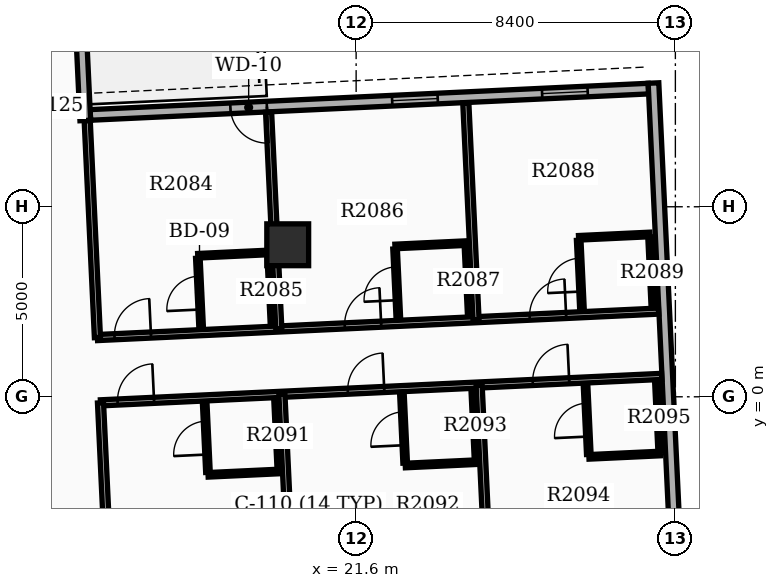
"""IFC4 building model, lengths in metres.
Left out: names, types, materials, properties, quantities, classifications, styles, units other than length and angle.
Written with IfcOpenShell. Run it as: python <this file> out.ifc"""

import sys

from ifc_helpers import new_model, si_unit, direction, frame, frame_2d, origin, origin_2d, place, context, subcontext, project, spatial, rectangle, extrude, element, fill, save


model = new_model("IFC4")
c1 = context("Model", 3, precision=1e-05, world=origin(), true_north=direction((0.0, 1.0)))
c2 = subcontext(c1, "Body", "Model", "MODEL_VIEW")
j1 = project(units=[si_unit("LENGTHUNIT", "METRE"), si_unit("PLANEANGLEUNIT", "RADIAN")], contexts=[c1])
p1 = place(None, origin())
s1 = spatial("IfcSite", under=j1, at=p1, CompositionType="ELEMENT")
p2 = place(p1, origin())
s2 = spatial("IfcBuilding", under=s1, at=p2, CompositionType="ELEMENT")
p3 = place(p2, frame((0.0, 0.0, 132.0)))
s3 = spatial("IfcBuildingStorey", under=s2, at=p3, CompositionType="ELEMENT", Elevation=132.0)
p4 = place(p3, frame((19.8, 4.0, 0.0), z_axis=(0.0, 0.0, 1.0), x_axis=(1.0, 0.0, 0.0)))
e1 = element("IfcColumn", 1, at=p4, inside=s3, PredefinedType="COLUMN", context=c2, shape_type="SweptSolid", body=[
    extrude(rectangle(XDim=1.1, YDim=1.1, at=origin_2d()), origin(), (0.0, 0.0, 1.0), 3.9),
])
p5 = place(p3, frame((29.291, 8.109, 0.0), z_axis=(0.0, 0.0, 1.0), x_axis=(-0.998889342735, -0.047117735191, 0.0)))
e2 = element("IfcWall", 2, at=p5, inside=s3, PredefinedType="STANDARD", context=c2, shape_type="SweptSolid", body=[
    extrude(rectangle(XDim=14.7, YDim=0.28, at=frame_2d((7.35, 0.0))), origin(), (0.0, 0.0, 1.0), 2.97),
])
p6 = place(p5, frame((1.6, 0.0, 0.8)))
e3 = element("IfcOpeningElement", 3, at=p6, cuts=e2, PredefinedType="OPENING", context=c2, shape_type="SweptSolid", body=[
    extrude(rectangle(XDim=1.2, YDim=1.6, at=frame_2d((0.6, 0.8))), frame((0.0, 0.15, 0.0), z_axis=(0.0, -1.0, 0.0), x_axis=(1.0, 0.0, 0.0)), (0.0, 0.0, 1.0), 0.3),
])
p7 = place(p5, frame((5.55, 0.0, 0.8)))
e4 = element("IfcOpeningElement", 4, at=p7, cuts=e2, PredefinedType="OPENING", context=c2, shape_type="SweptSolid", body=[
    extrude(rectangle(XDim=1.2, YDim=1.6, at=frame_2d((0.6, 0.8))), frame((0.0, 0.15, 0.0), z_axis=(0.0, -1.0, 0.0), x_axis=(1.0, 0.0, 0.0)), (0.0, 0.0, 1.0), 0.3),
])
p8 = place(p5, frame((10.05, 0.0, 0.0)))
e5 = element("IfcOpeningElement", 5, at=p8, cuts=e2, PredefinedType="OPENING", context=c2, shape_type="SweptSolid", body=[
    extrude(rectangle(XDim=0.96, YDim=2.1, at=frame_2d((0.48, 1.05))), frame((0.0, 0.15, 0.0), z_axis=(0.0, -1.0, 0.0), x_axis=(1.0, 0.0, 0.0)), (0.0, 0.0, 1.0), 0.3),
])
p9 = place(p3, frame((30.07, -5.45, 0.0), z_axis=(0.0, 0.0, 1.0), x_axis=(-0.047101845086, 0.998890092147, 0.0)))
e6 = element("IfcWall", 6, at=p9, inside=s3, PredefinedType="STANDARD", context=c2, shape_type="SweptSolid", body=[
    extrude(rectangle(XDim=13.72, YDim=0.28, at=frame_2d((6.86, 0.0))), origin(), (0.0, 0.0, 1.0), 2.97),
])
p10 = place(p9, frame((0.85, 0.0, 0.85)))
e7 = element("IfcOpeningElement", 7, at=p10, cuts=e6, PredefinedType="OPENING", context=c2, shape_type="SweptSolid", body=[
    extrude(rectangle(XDim=1.0, YDim=1.5, at=frame_2d((0.5, 0.75))), frame((0.0, 0.15, 0.0), z_axis=(0.0, -1.0, 0.0), x_axis=(1.0, 0.0, 0.0)), (0.0, 0.0, 1.0), 0.3),
])
p11 = place(p3, frame((14.474, 7.27, 0.0), z_axis=(0.0, 0.0, 1.0), x_axis=(-0.04712043756, 0.998889215261, 0.0)))
e8 = element("IfcWall", 8, at=p11, inside=s3, PredefinedType="STANDARD", context=c2, shape_type="SweptSolid", body=[
    extrude(rectangle(XDim=6.86, YDim=0.28, at=frame_2d((3.43, 0.0))), origin(), (0.0, 0.0, 1.0), 2.97),
])
p12 = place(p3, frame((14.793, 1.559, 0.0), z_axis=(0.0, 0.0, 1.0), x_axis=(0.99889000272, 0.04710374153, 0.0)))
e9 = element("IfcWall", 9, at=p12, inside=s3, PredefinedType="PARTITIONING", context=c2, shape_type="SweptSolid", body=[
    extrude(rectangle(XDim=14.782, YDim=0.16, at=frame_2d((7.391, 0.0))), origin(), (0.0, 0.0, 1.0), 2.96),
])
p13 = place(p12, frame((0.45, 0.0, 0.0)))
e10 = element("IfcOpeningElement", 10, at=p13, cuts=e9, PredefinedType="OPENING", context=c2, shape_type="SweptSolid", body=[
    extrude(rectangle(XDim=0.96, YDim=2.15, at=frame_2d((0.48, 1.075))), frame((0.0, 0.09, 0.0), z_axis=(0.0, -1.0, 0.0), x_axis=(1.0, 0.0, 0.0)), (0.0, 0.0, 1.0), 0.18),
])
p14 = place(p12, frame((6.514, 0.0, 0.0)))
e11 = element("IfcOpeningElement", 11, at=p14, cuts=e9, PredefinedType="OPENING", context=c2, shape_type="SweptSolid", body=[
    extrude(rectangle(XDim=0.96, YDim=2.15, at=frame_2d((0.48, 1.075))), frame((0.0, 0.09, 0.0), z_axis=(0.0, -1.0, 0.0), x_axis=(1.0, 0.0, 0.0)), (0.0, 0.0, 1.0), 0.18),
])
p15 = place(p12, frame((11.386, 0.0, 0.0)))
e12 = element("IfcOpeningElement", 12, at=p15, cuts=e9, PredefinedType="OPENING", context=c2, shape_type="SweptSolid", body=[
    extrude(rectangle(XDim=0.96, YDim=2.15, at=frame_2d((0.48, 1.075))), frame((0.0, 0.09, 0.0), z_axis=(0.0, -1.0, 0.0), x_axis=(1.0, 0.0, 0.0)), (0.0, 0.0, 1.0), 0.18),
])
p16 = place(p3, frame((14.793, 1.559, 0.0), z_axis=(0.0, 0.0, 1.0), x_axis=(-0.047100122846, 0.998890173356, 0.0)))
e13 = element("IfcWall", 13, at=p16, inside=s3, PredefinedType="PARTITIONING", context=c2, shape_type="SweptSolid", body=[
    extrude(rectangle(XDim=5.712, YDim=0.16, at=frame_2d((2.856, 0.0))), origin(), (0.0, 0.0, 1.0), 2.96),
])
p17 = place(p3, frame((19.566, 1.784, 0.0), z_axis=(0.0, 0.0, 1.0), x_axis=(-0.047102133785, 0.998890078534, 0.0)))
e14 = element("IfcWall", 14, at=p17, inside=s3, PredefinedType="PARTITIONING", context=c2, shape_type="SweptSolid", body=[
    extrude(rectangle(XDim=5.712, YDim=0.16, at=frame_2d((2.856, 0.0))), origin(), (0.0, 0.0, 1.0), 2.96),
])
p18 = place(p3, frame((17.521, 1.827, 0.0), z_axis=(0.0, 0.0, 1.0), x_axis=(-0.047214641863, 0.998884766924, 0.0)))
e15 = element("IfcWall", 15, at=p18, inside=s3, PredefinedType="PARTITIONING", context=c2, shape_type="SweptSolid", body=[
    extrude(rectangle(XDim=1.82, YDim=0.12, at=frame_2d((0.91, 0.0))), origin(), (0.0, 0.0, 1.0), 2.96),
])
p19 = place(p18, frame((0.47, 0.0, 0.0)))
e16 = element("IfcOpeningElement", 16, at=p19, cuts=e15, PredefinedType="OPENING", context=c2, shape_type="SweptSolid", body=[
    extrude(rectangle(XDim=0.88, YDim=2.1, at=frame_2d((0.44, 1.05))), frame((0.0, 0.07, 0.0), z_axis=(0.0, -1.0, 0.0), x_axis=(1.0, 0.0, 0.0)), (0.0, 0.0, 1.0), 0.14),
])
p20 = place(p3, frame((19.399, 1.916, 0.0), z_axis=(0.0, 0.0, 1.0), x_axis=(-0.047220968666, 0.998884467853, 0.0)))
e17 = element("IfcWall", 17, at=p20, inside=s3, PredefinedType="PARTITIONING", context=c2, shape_type="SweptSolid", body=[
    extrude(rectangle(XDim=1.82, YDim=0.12, at=frame_2d((0.91, 0.0))), origin(), (0.0, 0.0, 1.0), 2.96),
])
p21 = place(p3, frame((17.433, 3.71, 0.0), z_axis=(0.0, 0.0, 1.0), x_axis=(0.998888319371, 0.047139425368, 0.0)))
e18 = element("IfcWall", 18, at=p21, inside=s3, PredefinedType="PARTITIONING", context=c2, shape_type="SweptSolid", body=[
    extrude(rectangle(XDim=1.88, YDim=0.12, at=frame_2d((0.94, 0.0))), origin(), (0.0, 0.0, 1.0), 2.96),
])
p22 = place(p3, frame((24.755, 2.028, 0.0), z_axis=(0.0, 0.0, 1.0), x_axis=(-0.047102133785, 0.998890078534, 0.0)))
e19 = element("IfcWall", 19, at=p22, inside=s3, PredefinedType="PARTITIONING", context=c2, shape_type="SweptSolid", body=[
    extrude(rectangle(XDim=5.712, YDim=0.16, at=frame_2d((2.856, 0.0))), origin(), (0.0, 0.0, 1.0), 2.96),
])
p23 = place(p3, frame((22.711, 2.072, 0.0), z_axis=(0.0, 0.0, 1.0), x_axis=(-0.047080807099, 0.998891083954, 0.0)))
e20 = element("IfcWall", 20, at=p23, inside=s3, PredefinedType="PARTITIONING", context=c2, shape_type="SweptSolid", body=[
    extrude(rectangle(XDim=1.82, YDim=0.12, at=frame_2d((0.91, 0.0))), origin(), (0.0, 0.0, 1.0), 2.96),
])
p24 = place(p23, frame((0.47, 0.0, 0.0)))
e21 = element("IfcOpeningElement", 21, at=p24, cuts=e20, PredefinedType="OPENING", context=c2, shape_type="SweptSolid", body=[
    extrude(rectangle(XDim=0.88, YDim=2.1, at=frame_2d((0.44, 1.05))), frame((0.0, 0.07, 0.0), z_axis=(0.0, -1.0, 0.0), x_axis=(1.0, 0.0, 0.0)), (0.0, 0.0, 1.0), 0.14),
])
p25 = place(p3, frame((24.588, 2.161, 0.0), z_axis=(0.0, 0.0, 1.0), x_axis=(-0.047080807099, 0.998891083954, 0.0)))
e22 = element("IfcWall", 22, at=p25, inside=s3, PredefinedType="PARTITIONING", context=c2, shape_type="SweptSolid", body=[
    extrude(rectangle(XDim=1.82, YDim=0.12, at=frame_2d((0.91, 0.0))), origin(), (0.0, 0.0, 1.0), 2.96),
])
p26 = place(p3, frame((22.622, 3.955, 0.0), z_axis=(0.0, 0.0, 1.0), x_axis=(0.998888319371, 0.047139425368, 0.0)))
e23 = element("IfcWall", 23, at=p26, inside=s3, PredefinedType="PARTITIONING", context=c2, shape_type="SweptSolid", body=[
    extrude(rectangle(XDim=1.88, YDim=0.12, at=frame_2d((0.94, 0.0))), origin(), (0.0, 0.0, 1.0), 2.96),
])
p27 = place(p3, frame((27.542, 2.3, 0.0), z_axis=(0.0, 0.0, 1.0), x_axis=(-0.047087116047, 0.998890786574, 0.0)))
e24 = element("IfcWall", 24, at=p27, inside=s3, PredefinedType="PARTITIONING", context=c2, shape_type="SweptSolid", body=[
    extrude(rectangle(XDim=1.82, YDim=0.12, at=frame_2d((0.91, 0.0))), origin(), (0.0, 0.0, 1.0), 2.96),
])
p28 = place(p27, frame((0.47, 0.0, 0.0)))
e25 = element("IfcOpeningElement", 25, at=p28, cuts=e24, PredefinedType="OPENING", context=c2, shape_type="SweptSolid", body=[
    extrude(rectangle(XDim=0.88, YDim=2.1, at=frame_2d((0.44, 1.05))), frame((0.0, 0.07, 0.0), z_axis=(0.0, -1.0, 0.0), x_axis=(1.0, 0.0, 0.0)), (0.0, 0.0, 1.0), 0.14),
])
p29 = place(p3, frame((29.42, 2.388, 0.0), z_axis=(0.0, 0.0, 1.0), x_axis=(-0.047080807099, 0.998891083954, 0.0)))
e26 = element("IfcWall", 26, at=p29, inside=s3, PredefinedType="PARTITIONING", context=c2, shape_type="SweptSolid", body=[
    extrude(rectangle(XDim=1.82, YDim=0.12, at=frame_2d((0.91, 0.0))), origin(), (0.0, 0.0, 1.0), 2.96),
])
p30 = place(p3, frame((27.453, 4.183, 0.0), z_axis=(0.0, 0.0, 1.0), x_axis=(0.998888319371, 0.047139425368, 0.0)))
e27 = element("IfcWall", 27, at=p30, inside=s3, PredefinedType="PARTITIONING", context=c2, shape_type="SweptSolid", body=[
    extrude(rectangle(XDim=1.88, YDim=0.12, at=frame_2d((0.94, 0.0))), origin(), (0.0, 0.0, 1.0), 2.96),
])
p31 = place(p3, frame((14.874, -0.159, 0.0), z_axis=(0.0, 0.0, 1.0), x_axis=(0.99889000272, 0.04710374153, 0.0)))
e28 = element("IfcWall", 28, at=p31, inside=s3, PredefinedType="PARTITIONING", context=c2, shape_type="SweptSolid", body=[
    extrude(rectangle(XDim=14.782, YDim=0.16, at=frame_2d((7.391, 0.0))), origin(), (0.0, 0.0, 1.0), 2.96),
])
p32 = place(p31, frame((0.45, 0.0, 0.0)))
e29 = element("IfcOpeningElement", 29, at=p32, cuts=e28, PredefinedType="OPENING", context=c2, shape_type="SweptSolid", body=[
    extrude(rectangle(XDim=0.96, YDim=2.15, at=frame_2d((0.48, 1.075))), frame((0.0, 0.09, 0.0), z_axis=(0.0, -1.0, 0.0), x_axis=(1.0, 0.0, 0.0)), (0.0, 0.0, 1.0), 0.18),
])
p33 = place(p31, frame((6.514, 0.0, 0.0)))
e30 = element("IfcOpeningElement", 30, at=p33, cuts=e28, PredefinedType="OPENING", context=c2, shape_type="SweptSolid", body=[
    extrude(rectangle(XDim=0.96, YDim=2.15, at=frame_2d((0.48, 1.075))), frame((0.0, 0.09, 0.0), z_axis=(0.0, -1.0, 0.0), x_axis=(1.0, 0.0, 0.0)), (0.0, 0.0, 1.0), 0.18),
])
p34 = place(p31, frame((11.386, 0.0, 0.0)))
e31 = element("IfcOpeningElement", 31, at=p34, cuts=e28, PredefinedType="OPENING", context=c2, shape_type="SweptSolid", body=[
    extrude(rectangle(XDim=0.96, YDim=2.15, at=frame_2d((0.48, 1.075))), frame((0.0, 0.09, 0.0), z_axis=(0.0, -1.0, 0.0), x_axis=(1.0, 0.0, 0.0)), (0.0, 0.0, 1.0), 0.18),
])
for number, where, z_axis, x_axis in (
    (32, (14.874, -0.159, 0.0), (0.0, 0.0, 1.0), (0.047, -0.999, 0.0)),
    (33, (19.647, 0.066, 0.0), (0.0, 0.0, 1.0), (0.047, -0.999, 0.0)),
):
    element("IfcWall", number, at=place(p3, frame(where, z_axis=z_axis, x_axis=x_axis)), inside=s3, PredefinedType="PARTITIONING", context=c2, shape_type="SweptSolid", body=[
        extrude(rectangle(XDim=5.712, YDim=0.16, at=frame_2d((2.856, 0.0))), origin(), (0.0, 0.0, 1.0), 2.96),
    ])
p35 = place(p3, frame((17.701, -1.988, 0.0), z_axis=(0.0, 0.0, 1.0), x_axis=(-0.047220968666, 0.998884467853, 0.0)))
e34 = element("IfcWall", 34, at=p35, inside=s3, PredefinedType="PARTITIONING", context=c2, shape_type="SweptSolid", body=[
    extrude(rectangle(XDim=1.82, YDim=0.12, at=frame_2d((0.91, 0.0))), origin(), (0.0, 0.0, 1.0), 2.96),
])
p36 = place(p35, frame((0.47, 0.0, 0.0)))
e35 = element("IfcOpeningElement", 35, at=p36, cuts=e34, PredefinedType="OPENING", context=c2, shape_type="SweptSolid", body=[
    extrude(rectangle(XDim=0.88, YDim=2.1, at=frame_2d((0.44, 1.05))), frame((0.0, 0.07, 0.0), z_axis=(0.0, -1.0, 0.0), x_axis=(1.0, 0.0, 0.0)), (0.0, 0.0, 1.0), 0.14),
])
p37 = place(p3, frame((19.579, -1.9, 0.0), z_axis=(0.0, 0.0, 1.0), x_axis=(-0.047080807099, 0.998891083954, 0.0)))
e36 = element("IfcWall", 36, at=p37, inside=s3, PredefinedType="PARTITIONING", context=c2, shape_type="SweptSolid", body=[
    extrude(rectangle(XDim=1.82, YDim=0.12, at=frame_2d((0.91, 0.0))), origin(), (0.0, 0.0, 1.0), 2.96),
])
p38 = place(p3, frame((17.704, -2.053, 0.0), z_axis=(0.0, 0.0, 1.0), x_axis=(0.998888319371, 0.047139425368, 0.0)))
e37 = element("IfcWall", 37, at=p38, inside=s3, PredefinedType="PARTITIONING", context=c2, shape_type="SweptSolid", body=[
    extrude(rectangle(XDim=1.88, YDim=0.12, at=frame_2d((0.94, 0.0))), origin(), (0.0, 0.0, 1.0), 2.96),
])
p39 = place(p3, frame((24.836, 0.31, 0.0), z_axis=(0.0, 0.0, 1.0), x_axis=(0.047100122846, -0.998890173356, 0.0)))
e38 = element("IfcWall", 38, at=p39, inside=s3, PredefinedType="PARTITIONING", context=c2, shape_type="SweptSolid", body=[
    extrude(rectangle(XDim=5.712, YDim=0.16, at=frame_2d((2.856, 0.0))), origin(), (0.0, 0.0, 1.0), 2.96),
])
p40 = place(p3, frame((22.89, -1.744, 0.0), z_axis=(0.0, 0.0, 1.0), x_axis=(-0.047087116047, 0.998890786574, 0.0)))
e39 = element("IfcWall", 39, at=p40, inside=s3, PredefinedType="PARTITIONING", context=c2, shape_type="SweptSolid", body=[
    extrude(rectangle(XDim=1.82, YDim=0.12, at=frame_2d((0.91, 0.0))), origin(), (0.0, 0.0, 1.0), 2.96),
])
p41 = place(p40, frame((0.47, 0.0, 0.0)))
e40 = element("IfcOpeningElement", 40, at=p41, cuts=e39, PredefinedType="OPENING", context=c2, shape_type="SweptSolid", body=[
    extrude(rectangle(XDim=0.88, YDim=2.1, at=frame_2d((0.44, 1.05))), frame((0.0, 0.07, 0.0), z_axis=(0.0, -1.0, 0.0), x_axis=(1.0, 0.0, 0.0)), (0.0, 0.0, 1.0), 0.14),
])
p42 = place(p3, frame((24.769, -1.655, 0.0), z_axis=(0.0, 0.0, 1.0), x_axis=(-0.047220968666, 0.998884467853, 0.0)))
e41 = element("IfcWall", 41, at=p42, inside=s3, PredefinedType="PARTITIONING", context=c2, shape_type="SweptSolid", body=[
    extrude(rectangle(XDim=1.82, YDim=0.12, at=frame_2d((0.91, 0.0))), origin(), (0.0, 0.0, 1.0), 2.96),
])
p43 = place(p3, frame((22.894, -1.809, 0.0), z_axis=(0.0, 0.0, 1.0), x_axis=(0.998888319371, 0.047139425368, 0.0)))
e42 = element("IfcWall", 42, at=p43, inside=s3, PredefinedType="PARTITIONING", context=c2, shape_type="SweptSolid", body=[
    extrude(rectangle(XDim=1.88, YDim=0.12, at=frame_2d((0.94, 0.0))), origin(), (0.0, 0.0, 1.0), 2.96),
])
p44 = place(p3, frame((27.722, -1.516, 0.0), z_axis=(0.0, 0.0, 1.0), x_axis=(-0.047080807099, 0.998891083954, 0.0)))
e43 = element("IfcWall", 43, at=p44, inside=s3, PredefinedType="PARTITIONING", context=c2, shape_type="SweptSolid", body=[
    extrude(rectangle(XDim=1.82, YDim=0.12, at=frame_2d((0.91, 0.0))), origin(), (0.0, 0.0, 1.0), 2.96),
])
p45 = place(p44, frame((0.47, 0.0, 0.0)))
e44 = element("IfcOpeningElement", 44, at=p45, cuts=e43, PredefinedType="OPENING", context=c2, shape_type="SweptSolid", body=[
    extrude(rectangle(XDim=0.88, YDim=2.1, at=frame_2d((0.44, 1.05))), frame((0.0, 0.07, 0.0), z_axis=(0.0, -1.0, 0.0), x_axis=(1.0, 0.0, 0.0)), (0.0, 0.0, 1.0), 0.14),
])
p46 = place(p3, frame((29.6, -1.427, 0.0), z_axis=(0.0, 0.0, 1.0), x_axis=(-0.047080807099, 0.998891083954, 0.0)))
e45 = element("IfcWall", 45, at=p46, inside=s3, PredefinedType="PARTITIONING", context=c2, shape_type="SweptSolid", body=[
    extrude(rectangle(XDim=1.82, YDim=0.12, at=frame_2d((0.91, 0.0))), origin(), (0.0, 0.0, 1.0), 2.96),
])
p47 = place(p3, frame((27.725, -1.581, 0.0), z_axis=(0.0, 0.0, 1.0), x_axis=(0.998888607882, 0.047133311408, 0.0)))
e46 = element("IfcWall", 46, at=p47, inside=s3, PredefinedType="PARTITIONING", context=c2, shape_type="SweptSolid", body=[
    extrude(rectangle(XDim=1.88, YDim=0.12, at=frame_2d((0.94, 0.0))), origin(), (0.0, 0.0, 1.0), 2.96),
])
p48 = place(p6, origin())
e47 = element("IfcWindow", 47, at=p48, inside=s3, PartitioningType="SINGLE_PANEL", PredefinedType="WINDOW", context=c2, shape_type="SweptSolid", body=[
    extrude(rectangle(XDim=1.2, YDim=1.6, at=frame_2d((0.6, 0.8))), frame((0.0, 0.03, 0.0), z_axis=(0.0, -1.0, 0.0), x_axis=(1.0, 0.0, 0.0)), (0.0, 0.0, 1.0), 0.06),
])
fill(e3, e47)
p49 = place(p7, origin())
e48 = element("IfcWindow", 48, at=p49, inside=s3, PartitioningType="SINGLE_PANEL", PredefinedType="WINDOW", context=c2, shape_type="SweptSolid", body=[
    extrude(rectangle(XDim=1.2, YDim=1.6, at=frame_2d((0.6, 0.8))), frame((0.0, 0.03, 0.0), z_axis=(0.0, -1.0, 0.0), x_axis=(1.0, 0.0, 0.0)), (0.0, 0.0, 1.0), 0.06),
])
fill(e4, e48)
p50 = place(p8, origin())
e49 = element("IfcDoor", 49, at=p50, inside=s3, OperationType="SINGLE_SWING_LEFT", PredefinedType="DOOR", context=c2, shape_type="SweptSolid", body=[
    extrude(rectangle(XDim=0.96, YDim=2.1, at=frame_2d((0.48, 1.05))), frame((0.0, 0.025, 0.0), z_axis=(0.0, -1.0, 0.0), x_axis=(1.0, 0.0, 0.0)), (0.0, 0.0, 1.0), 0.05),
])
fill(e5, e49)
p51 = place(p13, origin())
e50 = element("IfcDoor", 50, at=p51, inside=s3, OperationType="SINGLE_SWING_RIGHT", PredefinedType="DOOR", context=c2, shape_type="SweptSolid", body=[
    extrude(rectangle(XDim=0.96, YDim=2.15, at=frame_2d((0.48, 1.075))), frame((0.0, 0.025, 0.0), z_axis=(0.0, -1.0, 0.0), x_axis=(1.0, 0.0, 0.0)), (0.0, 0.0, 1.0), 0.05),
])
fill(e10, e50)
p52 = place(p19, origin())
e51 = element("IfcDoor", 51, at=p52, inside=s3, OperationType="SINGLE_SWING_LEFT", PredefinedType="DOOR", context=c2, shape_type="SweptSolid", body=[
    extrude(rectangle(XDim=0.88, YDim=2.1, at=frame_2d((0.44, 1.05))), frame((0.0, 0.025, 0.0), z_axis=(0.0, -1.0, 0.0), x_axis=(1.0, 0.0, 0.0)), (0.0, 0.0, 1.0), 0.05),
])
fill(e16, e51)
p53 = place(p14, origin())
e52 = element("IfcDoor", 52, at=p53, inside=s3, OperationType="SINGLE_SWING_RIGHT", PredefinedType="DOOR", context=c2, shape_type="SweptSolid", body=[
    extrude(rectangle(XDim=0.96, YDim=2.15, at=frame_2d((0.48, 1.075))), frame((0.0, 0.025, 0.0), z_axis=(0.0, -1.0, 0.0), x_axis=(1.0, 0.0, 0.0)), (0.0, 0.0, 1.0), 0.05),
])
fill(e11, e52)
p54 = place(p24, origin())
e53 = element("IfcDoor", 53, at=p54, inside=s3, OperationType="SINGLE_SWING_LEFT", PredefinedType="DOOR", context=c2, shape_type="SweptSolid", body=[
    extrude(rectangle(XDim=0.88, YDim=2.1, at=frame_2d((0.44, 1.05))), frame((0.0, 0.025, 0.0), z_axis=(0.0, -1.0, 0.0), x_axis=(1.0, 0.0, 0.0)), (0.0, 0.0, 1.0), 0.05),
])
fill(e21, e53)
p55 = place(p15, origin())
e54 = element("IfcDoor", 54, at=p55, inside=s3, OperationType="SINGLE_SWING_RIGHT", PredefinedType="DOOR", context=c2, shape_type="SweptSolid", body=[
    extrude(rectangle(XDim=0.96, YDim=2.15, at=frame_2d((0.48, 1.075))), frame((0.0, 0.025, 0.0), z_axis=(0.0, -1.0, 0.0), x_axis=(1.0, 0.0, 0.0)), (0.0, 0.0, 1.0), 0.05),
])
fill(e12, e54)
p56 = place(p28, origin())
e55 = element("IfcDoor", 55, at=p56, inside=s3, OperationType="SINGLE_SWING_LEFT", PredefinedType="DOOR", context=c2, shape_type="SweptSolid", body=[
    extrude(rectangle(XDim=0.88, YDim=2.1, at=frame_2d((0.44, 1.05))), frame((0.0, 0.025, 0.0), z_axis=(0.0, -1.0, 0.0), x_axis=(1.0, 0.0, 0.0)), (0.0, 0.0, 1.0), 0.05),
])
fill(e25, e55)
p57 = place(p32, origin())
e56 = element("IfcDoor", 56, at=p57, inside=s3, OperationType="SINGLE_SWING_RIGHT", PredefinedType="DOOR", context=c2, shape_type="SweptSolid", body=[
    extrude(rectangle(XDim=0.96, YDim=2.15, at=frame_2d((0.48, 1.075))), frame((0.0, 0.025, 0.0), z_axis=(0.0, -1.0, 0.0), x_axis=(1.0, 0.0, 0.0)), (0.0, 0.0, 1.0), 0.05),
])
fill(e29, e56)
p58 = place(p36, origin())
e57 = element("IfcDoor", 57, at=p58, inside=s3, OperationType="SINGLE_SWING_LEFT", PredefinedType="DOOR", context=c2, shape_type="SweptSolid", body=[
    extrude(rectangle(XDim=0.88, YDim=2.1, at=frame_2d((0.44, 1.05))), frame((0.0, 0.025, 0.0), z_axis=(0.0, -1.0, 0.0), x_axis=(1.0, 0.0, 0.0)), (0.0, 0.0, 1.0), 0.05),
])
fill(e35, e57)
p59 = place(p33, origin())
e58 = element("IfcDoor", 58, at=p59, inside=s3, OperationType="SINGLE_SWING_RIGHT", PredefinedType="DOOR", context=c2, shape_type="SweptSolid", body=[
    extrude(rectangle(XDim=0.96, YDim=2.15, at=frame_2d((0.48, 1.075))), frame((0.0, 0.025, 0.0), z_axis=(0.0, -1.0, 0.0), x_axis=(1.0, 0.0, 0.0)), (0.0, 0.0, 1.0), 0.05),
])
fill(e30, e58)
p60 = place(p41, origin())
e59 = element("IfcDoor", 59, at=p60, inside=s3, OperationType="SINGLE_SWING_LEFT", PredefinedType="DOOR", context=c2, shape_type="SweptSolid", body=[
    extrude(rectangle(XDim=0.88, YDim=2.1, at=frame_2d((0.44, 1.05))), frame((0.0, 0.025, 0.0), z_axis=(0.0, -1.0, 0.0), x_axis=(1.0, 0.0, 0.0)), (0.0, 0.0, 1.0), 0.05),
])
fill(e40, e59)
p61 = place(p34, origin())
e60 = element("IfcDoor", 60, at=p61, inside=s3, OperationType="SINGLE_SWING_RIGHT", PredefinedType="DOOR", context=c2, shape_type="SweptSolid", body=[
    extrude(rectangle(XDim=0.96, YDim=2.15, at=frame_2d((0.48, 1.075))), frame((0.0, 0.025, 0.0), z_axis=(0.0, -1.0, 0.0), x_axis=(1.0, 0.0, 0.0)), (0.0, 0.0, 1.0), 0.05),
])
fill(e31, e60)
p62 = place(p45, origin())
e61 = element("IfcDoor", 61, at=p62, inside=s3, OperationType="SINGLE_SWING_LEFT", PredefinedType="DOOR", context=c2, shape_type="SweptSolid", body=[
    extrude(rectangle(XDim=0.88, YDim=2.1, at=frame_2d((0.44, 1.05))), frame((0.0, 0.025, 0.0), z_axis=(0.0, -1.0, 0.0), x_axis=(1.0, 0.0, 0.0)), (0.0, 0.0, 1.0), 0.05),
])
fill(e44, e61)
save(model, sys.argv[1])
